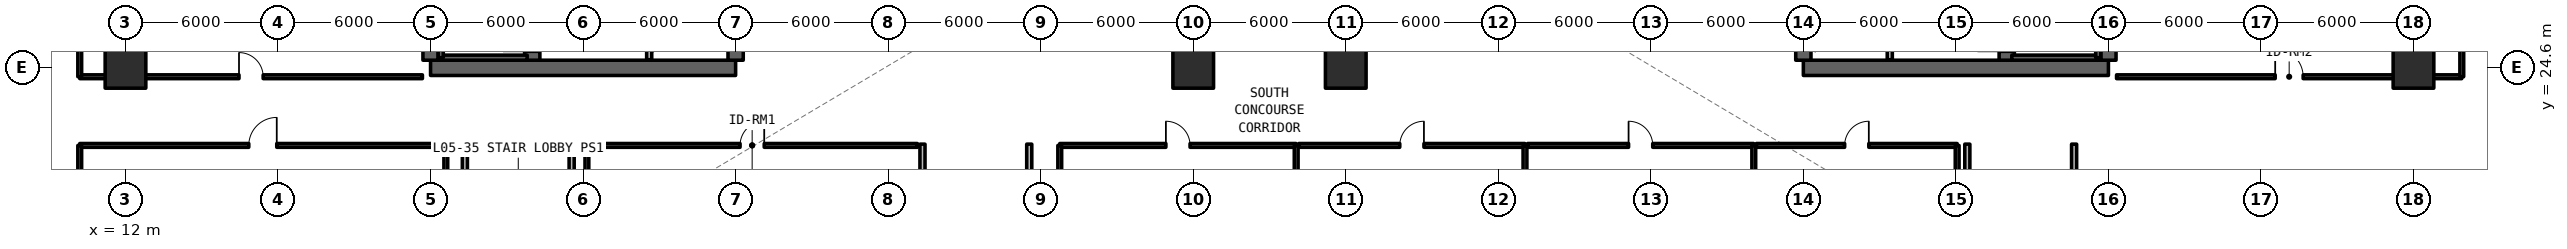
"""IFC4 building model, lengths in metres.
Left out: names, types, materials, properties, quantities, classifications, styles, units other than length and angle.
Written with IfcOpenShell. Run it as: python <this file> out.ifc"""

import sys

from ifc_helpers import new_model, si_unit, direction, frame, frame_2d, origin, origin_2d, place, context, subcontext, project, spatial, rectangle, extrude, element, fill, save


model = new_model("IFC4")
c1 = context("Model", 3, precision=1e-05, world=origin(), true_north=direction((0.0, 1.0)))
c2 = subcontext(c1, "Body", "Model", "MODEL_VIEW")
j1 = project(units=[si_unit("LENGTHUNIT", "METRE"), si_unit("PLANEANGLEUNIT", "RADIAN")], contexts=[c1])
p1 = place(None, origin())
s1 = spatial("IfcSite", under=j1, at=p1, CompositionType="ELEMENT")
p2 = place(p1, origin())
s2 = spatial("IfcBuilding", under=s1, at=p2, CompositionType="ELEMENT")
p3 = place(p2, frame((0.0, 0.0, 19.47)))
s3 = spatial("IfcBuildingStorey", under=s2, at=p3, CompositionType="ELEMENT", Elevation=19.47)
p4 = place(p3, frame((24.0, 24.6, 0.0), z_axis=(0.0, 0.0, 1.0), x_axis=(1.0, 0.0, 0.0)))
e1 = element("IfcWall", 1, at=p4, inside=s3, PredefinedType="SHEAR", context=c2, shape_type="SweptSolid", body=[
    extrude(rectangle(XDim=12.0, YDim=0.6, at=frame_2d((6.0, 0.0))), origin(), (0.0, 0.0, 1.0), 4.62),
])
p5 = place(p3, frame((24.0, 24.9, 0.0), z_axis=(0.0, 0.0, 1.0), x_axis=(0.0, 1.0, 0.0)))
e2 = element("IfcWall", 2, at=p5, inside=s3, PredefinedType="SHEAR", context=c2, shape_type="SweptSolid", body=[
    extrude(rectangle(XDim=17.4, YDim=0.6, at=frame_2d((8.7, 0.0))), origin(), (0.0, 0.0, 1.0), 4.62),
])
p6 = place(p3, frame((36.0, 24.9, 0.0), z_axis=(0.0, 0.0, 1.0), x_axis=(0.0, 1.0, 0.0)))
e3 = element("IfcWall", 3, at=p6, inside=s3, PredefinedType="SHEAR", context=c2, shape_type="SweptSolid", body=[
    extrude(rectangle(XDim=8.9, YDim=0.6, at=frame_2d((4.45, 0.0))), origin(), (0.0, 0.0, 1.0), 4.62),
])
p7 = place(p3, frame((28.0, 24.9, 0.0), z_axis=(0.0, 0.0, 1.0), x_axis=(0.0, 1.0, 0.0)))
e4 = element("IfcWall", 4, at=p7, inside=s3, PredefinedType="SHEAR", context=c2, shape_type="SweptSolid", body=[
    extrude(rectangle(XDim=17.4, YDim=0.6, at=frame_2d((8.7, 0.0))), origin(), (0.0, 0.0, 1.0), 4.62),
])
p8 = place(p7, frame((0.35, 0.0, 0.0)))
e5 = element("IfcOpeningElement", 5, at=p8, cuts=e4, PredefinedType="OPENING", context=c2, shape_type="SweptSolid", body=[
    extrude(rectangle(XDim=1.15, YDim=2.15, at=frame_2d((0.575, 1.075))), frame((0.0, 0.31, 0.0), z_axis=(0.0, -1.0, 0.0), x_axis=(1.0, 0.0, 0.0)), (0.0, 0.0, 1.0), 0.62),
])
p9 = place(p7, frame((9.55, 0.0, 0.0)))
e6 = element("IfcOpeningElement", 6, at=p9, cuts=e4, PredefinedType="OPENING", context=c2, shape_type="SweptSolid", body=[
    extrude(rectangle(XDim=1.15, YDim=2.15, at=frame_2d((0.575, 1.075))), frame((0.0, 0.31, 0.0), z_axis=(0.0, -1.0, 0.0), x_axis=(1.0, 0.0, 0.0)), (0.0, 0.0, 1.0), 0.62),
])
p10 = place(p3, frame((78.0, 24.6, 0.0), z_axis=(0.0, 0.0, 1.0), x_axis=(1.0, 0.0, 0.0)))
e7 = element("IfcWall", 7, at=p10, inside=s3, PredefinedType="SHEAR", context=c2, shape_type="SweptSolid", body=[
    extrude(rectangle(XDim=12.0, YDim=0.6, at=frame_2d((6.0, 0.0))), origin(), (0.0, 0.0, 1.0), 4.62),
])
p11 = place(p3, frame((90.0, 24.9, 0.0), z_axis=(0.0, 0.0, 1.0), x_axis=(0.0, 1.0, 0.0)))
e8 = element("IfcWall", 8, at=p11, inside=s3, PredefinedType="SHEAR", context=c2, shape_type="SweptSolid", body=[
    extrude(rectangle(XDim=17.4, YDim=0.6, at=frame_2d((8.7, 0.0))), origin(), (0.0, 0.0, 1.0), 4.62),
])
p12 = place(p3, frame((78.0, 24.9, 0.0), z_axis=(0.0, 0.0, 1.0), x_axis=(0.0, 1.0, 0.0)))
e9 = element("IfcWall", 9, at=p12, inside=s3, PredefinedType="SHEAR", context=c2, shape_type="SweptSolid", body=[
    extrude(rectangle(XDim=8.9, YDim=0.6, at=frame_2d((4.45, 0.0))), origin(), (0.0, 0.0, 1.0), 4.62),
])
p13 = place(p3, frame((86.0, 24.9, 0.0), z_axis=(0.0, 0.0, 1.0), x_axis=(0.0, 1.0, 0.0)))
e10 = element("IfcWall", 10, at=p13, inside=s3, PredefinedType="SHEAR", context=c2, shape_type="SweptSolid", body=[
    extrude(rectangle(XDim=17.4, YDim=0.6, at=frame_2d((8.7, 0.0))), origin(), (0.0, 0.0, 1.0), 4.62),
])
p14 = place(p13, frame((0.35, 0.0, 0.0)))
e11 = element("IfcOpeningElement", 11, at=p14, cuts=e10, PredefinedType="OPENING", context=c2, shape_type="SweptSolid", body=[
    extrude(rectangle(XDim=1.15, YDim=2.15, at=frame_2d((0.575, 1.075))), frame((0.0, 0.31, 0.0), z_axis=(0.0, -1.0, 0.0), x_axis=(1.0, 0.0, 0.0)), (0.0, 0.0, 1.0), 0.62),
])
p15 = place(p13, frame((9.55, 0.0, 0.0)))
e12 = element("IfcOpeningElement", 12, at=p15, cuts=e10, PredefinedType="OPENING", context=c2, shape_type="SweptSolid", body=[
    extrude(rectangle(XDim=1.15, YDim=2.15, at=frame_2d((0.575, 1.075))), frame((0.0, 0.31, 0.0), z_axis=(0.0, -1.0, 0.0), x_axis=(1.0, 0.0, 0.0)), (0.0, 0.0, 1.0), 0.62),
])
for number, where, z_axis, x_axis in (
    (13, (12.0, 24.6, 0.0), (0.0, 0.0, 1.0), (1.0, 0.0, 0.0)),
    (14, (54.0, 24.6, 0.0), (0.0, 0.0, 1.0), (1.0, 0.0, 0.0)),
    (15, (60.0, 24.6, 0.0), (0.0, 0.0, 1.0), (1.0, 0.0, 0.0)),
    (16, (102.0, 24.6, 0.0), (0.0, 0.0, 1.0), (1.0, 0.0, 0.0)),
):
    element("IfcColumn", number, at=place(p3, frame(where, z_axis=z_axis, x_axis=x_axis)), inside=s3, PredefinedType="COLUMN", context=c2, shape_type="SweptSolid", body=[
        extrude(rectangle(XDim=1.6, YDim=1.6, at=origin_2d()), origin(), (0.0, 0.0, 1.0), 4.62),
    ])
p16 = place(p3, frame((32.6, 24.92, 0.0), z_axis=(0.0, 0.0, 1.0), x_axis=(0.0, 1.0, 0.0)))
e17 = element("IfcWall", 17, at=p16, inside=s3, PredefinedType="SOLIDWALL", context=c2, shape_type="SweptSolid", body=[
    extrude(rectangle(XDim=3.58, YDim=0.2, at=frame_2d((1.79, 0.0))), origin(), (0.0, 0.0, 1.0), 3.49),
])
p17 = place(p16, frame((1.3, 0.0, 0.0)))
e18 = element("IfcOpeningElement", 18, at=p17, cuts=e17, PredefinedType="OPENING", context=c2, shape_type="SweptSolid", body=[
    extrude(rectangle(XDim=1.1, YDim=2.2, at=frame_2d((0.55, 1.1))), frame((0.0, 0.11, 0.0), z_axis=(0.0, -1.0, 0.0), x_axis=(1.0, 0.0, 0.0)), (0.0, 0.0, 1.0), 0.22),
])
p18 = place(p3, frame((81.4, 24.92, 0.0), z_axis=(0.0, 0.0, 1.0), x_axis=(0.0, 1.0, 0.0)))
e19 = element("IfcWall", 19, at=p18, inside=s3, PredefinedType="SOLIDWALL", context=c2, shape_type="SweptSolid", body=[
    extrude(rectangle(XDim=3.58, YDim=0.2, at=frame_2d((1.79, 0.0))), origin(), (0.0, 0.0, 1.0), 3.49),
])
p19 = place(p18, frame((1.3, 0.0, 0.0)))
e20 = element("IfcOpeningElement", 20, at=p19, cuts=e19, PredefinedType="OPENING", context=c2, shape_type="SweptSolid", body=[
    extrude(rectangle(XDim=1.1, YDim=2.2, at=frame_2d((0.55, 1.1))), frame((0.0, 0.11, 0.0), z_axis=(0.0, -1.0, 0.0), x_axis=(1.0, 0.0, 0.0)), (0.0, 0.0, 1.0), 0.22),
])
for number, where, z_axis, x_axis in (
    (21, (25.35, 17.0, 0.0), (0.0, 0.0, 1.0), (0.0, 1.0, 0.0)),
    (22, (29.55, 17.0, 0.0), (0.0, 0.0, 1.0), (0.0, 1.0, 0.0)),
    (23, (43.35, 17.0, 0.0), (0.0, 0.0, 1.0), (0.0, 1.0, 0.0)),
    (24, (47.55, 17.0, 0.0), (0.0, 0.0, 1.0), (0.0, 1.0, 0.0)),
    (25, (84.45, 17.0, 0.0), (0.0, 0.0, 1.0), (0.0, 1.0, 0.0)),
    (26, (88.65, 17.0, 0.0), (0.0, 0.0, 1.0), (0.0, 1.0, 0.0)),
):
    element("IfcWall", number, at=place(p3, frame(where, z_axis=z_axis, x_axis=x_axis)), inside=s3, PredefinedType="SOLIDWALL", context=c2, shape_type="SweptSolid", body=[
        extrude(rectangle(XDim=4.6, YDim=0.2, at=frame_2d((2.3, 0.0))), origin(), (0.0, 0.0, 1.0), 3.49),
    ])
p20 = place(p3, frame((30.15, 21.55, 0.0), z_axis=(0.0, 0.0, 1.0), x_axis=(1.0, 0.0, 0.0)))
e27 = element("IfcWall", 27, at=p20, inside=s3, PredefinedType="SOLIDWALL", context=c2, shape_type="SweptSolid", body=[
    extrude(rectangle(XDim=13.0, YDim=0.15, at=frame_2d((6.5, 0.0))), origin(), (0.0, 0.0, 1.0), 3.49),
])
p21 = place(p20, frame((6.025, 0.0, 0.0)))
e28 = element("IfcOpeningElement", 28, at=p21, cuts=e27, PredefinedType="OPENING", context=c2, shape_type="SweptSolid", body=[
    extrude(rectangle(XDim=0.95, YDim=2.15, at=frame_2d((0.475, 1.075))), frame((0.0, 0.085, 0.0), z_axis=(0.0, -1.0, 0.0), x_axis=(1.0, 0.0, 0.0)), (0.0, 0.0, 1.0), 0.17),
])
p22 = place(p3, frame((30.15, 4.28, 0.0), z_axis=(0.0, 0.0, 1.0), x_axis=(0.0, 1.0, 0.0)))
e29 = element("IfcWall", 29, at=p22, inside=s3, PredefinedType="SOLIDWALL", context=c2, shape_type="SweptSolid", body=[
    extrude(rectangle(XDim=17.27, YDim=0.15, at=frame_2d((8.635, 0.0))), origin(), (0.0, 0.0, 1.0), 3.49),
])
p23 = place(p3, frame((48.75, 21.55, 0.0), z_axis=(0.0, 0.0, 1.0), x_axis=(1.0, 0.0, 0.0)))
e30 = element("IfcWall", 30, at=p23, inside=s3, PredefinedType="SOLIDWALL", context=c2, shape_type="SweptSolid", body=[
    extrude(rectangle(XDim=9.3, YDim=0.15, at=frame_2d((4.65, 0.0))), origin(), (0.0, 0.0, 1.0), 3.49),
])
p24 = place(p23, frame((4.175, 0.0, 0.0)))
e31 = element("IfcOpeningElement", 31, at=p24, cuts=e30, PredefinedType="OPENING", context=c2, shape_type="SweptSolid", body=[
    extrude(rectangle(XDim=0.95, YDim=2.15, at=frame_2d((0.475, 1.075))), frame((0.0, 0.085, 0.0), z_axis=(0.0, -1.0, 0.0), x_axis=(1.0, 0.0, 0.0)), (0.0, 0.0, 1.0), 0.17),
])
for number, where, z_axis, x_axis in (
    (32, (48.75, 4.28, 0.0), (0.0, 0.0, 1.0), (0.0, 1.0, 0.0)),
    (33, (58.05, 4.28, 0.0), (0.0, 0.0, 1.0), (0.0, 1.0, 0.0)),
):
    element("IfcWall", number, at=place(p3, frame(where, z_axis=z_axis, x_axis=x_axis)), inside=s3, PredefinedType="SOLIDWALL", context=c2, shape_type="SweptSolid", body=[
        extrude(rectangle(XDim=17.27, YDim=0.15, at=frame_2d((8.635, 0.0))), origin(), (0.0, 0.0, 1.0), 3.49),
    ])
p25 = place(p3, frame((58.15, 21.55, 0.0), z_axis=(0.0, 0.0, 1.0), x_axis=(1.0, 0.0, 0.0)))
e34 = element("IfcWall", 34, at=p25, inside=s3, PredefinedType="SOLIDWALL", context=c2, shape_type="SweptSolid", body=[
    extrude(rectangle(XDim=8.9, YDim=0.15, at=frame_2d((4.45, 0.0))), origin(), (0.0, 0.0, 1.0), 3.49),
])
p26 = place(p25, frame((3.975, 0.0, 0.0)))
e35 = element("IfcOpeningElement", 35, at=p26, cuts=e34, PredefinedType="OPENING", context=c2, shape_type="SweptSolid", body=[
    extrude(rectangle(XDim=0.95, YDim=2.15, at=frame_2d((0.475, 1.075))), frame((0.0, 0.085, 0.0), z_axis=(0.0, -1.0, 0.0), x_axis=(1.0, 0.0, 0.0)), (0.0, 0.0, 1.0), 0.17),
])
p27 = place(p3, frame((67.05, 4.28, 0.0), z_axis=(0.0, 0.0, 1.0), x_axis=(0.0, 1.0, 0.0)))
e36 = element("IfcWall", 36, at=p27, inside=s3, PredefinedType="SOLIDWALL", context=c2, shape_type="SweptSolid", body=[
    extrude(rectangle(XDim=17.27, YDim=0.15, at=frame_2d((8.635, 0.0))), origin(), (0.0, 0.0, 1.0), 3.49),
])
p28 = place(p3, frame((67.15, 21.55, 0.0), z_axis=(0.0, 0.0, 1.0), x_axis=(1.0, 0.0, 0.0)))
e37 = element("IfcWall", 37, at=p28, inside=s3, PredefinedType="SOLIDWALL", context=c2, shape_type="SweptSolid", body=[
    extrude(rectangle(XDim=8.9, YDim=0.15, at=frame_2d((4.45, 0.0))), origin(), (0.0, 0.0, 1.0), 3.49),
])
p29 = place(p28, frame((3.975, 0.0, 0.0)))
e38 = element("IfcOpeningElement", 38, at=p29, cuts=e37, PredefinedType="OPENING", context=c2, shape_type="SweptSolid", body=[
    extrude(rectangle(XDim=0.95, YDim=2.15, at=frame_2d((0.475, 1.075))), frame((0.0, 0.085, 0.0), z_axis=(0.0, -1.0, 0.0), x_axis=(1.0, 0.0, 0.0)), (0.0, 0.0, 1.0), 0.17),
])
p30 = place(p3, frame((76.05, 4.28, 0.0), z_axis=(0.0, 0.0, 1.0), x_axis=(0.0, 1.0, 0.0)))
e39 = element("IfcWall", 39, at=p30, inside=s3, PredefinedType="SOLIDWALL", context=c2, shape_type="SweptSolid", body=[
    extrude(rectangle(XDim=17.27, YDim=0.15, at=frame_2d((8.635, 0.0))), origin(), (0.0, 0.0, 1.0), 3.49),
])
p31 = place(p3, frame((76.15, 21.55, 0.0), z_axis=(0.0, 0.0, 1.0), x_axis=(1.0, 0.0, 0.0)))
e40 = element("IfcWall", 40, at=p31, inside=s3, PredefinedType="SOLIDWALL", context=c2, shape_type="SweptSolid", body=[
    extrude(rectangle(XDim=7.9, YDim=0.15, at=frame_2d((3.95, 0.0))), origin(), (0.0, 0.0, 1.0), 3.49),
])
p32 = place(p31, frame((3.475, 0.0, 0.0)))
e41 = element("IfcOpeningElement", 41, at=p32, cuts=e40, PredefinedType="OPENING", context=c2, shape_type="SweptSolid", body=[
    extrude(rectangle(XDim=0.95, YDim=2.15, at=frame_2d((0.475, 1.075))), frame((0.0, 0.085, 0.0), z_axis=(0.0, -1.0, 0.0), x_axis=(1.0, 0.0, 0.0)), (0.0, 0.0, 1.0), 0.17),
])
p33 = place(p3, frame((84.05, 4.28, 0.0), z_axis=(0.0, 0.0, 1.0), x_axis=(0.0, 1.0, 0.0)))
e42 = element("IfcWall", 42, at=p33, inside=s3, PredefinedType="SOLIDWALL", context=c2, shape_type="SweptSolid", body=[
    extrude(rectangle(XDim=17.27, YDim=0.15, at=frame_2d((8.635, 0.0))), origin(), (0.0, 0.0, 1.0), 3.49),
])
p34 = place(p3, frame((10.2, 24.25, 0.0), z_axis=(0.0, 0.0, 1.0), x_axis=(1.0, 0.0, 0.0)))
e43 = element("IfcWall", 43, at=p34, inside=s3, PredefinedType="SOLIDWALL", context=c2, shape_type="SweptSolid", body=[
    extrude(rectangle(XDim=13.48, YDim=0.15, at=frame_2d((6.74, 0.0))), origin(), (0.0, 0.0, 1.0), 3.49),
])
p35 = place(p34, frame((6.265, 0.0, 0.0)))
e44 = element("IfcOpeningElement", 44, at=p35, cuts=e43, PredefinedType="OPENING", context=c2, shape_type="SweptSolid", body=[
    extrude(rectangle(XDim=0.95, YDim=2.15, at=frame_2d((0.475, 1.075))), frame((0.0, 0.085, 0.0), z_axis=(0.0, -1.0, 0.0), x_axis=(1.0, 0.0, 0.0)), (0.0, 0.0, 1.0), 0.17),
])
p36 = place(p3, frame((10.2, 24.25, 0.0), z_axis=(0.0, 0.0, 1.0), x_axis=(0.0, 1.0, 0.0)))
e45 = element("IfcWall", 45, at=p36, inside=s3, PredefinedType="SOLIDWALL", context=c2, shape_type="SweptSolid", body=[
    extrude(rectangle(XDim=9.15, YDim=0.15, at=frame_2d((4.575, 0.0))), origin(), (0.0, 0.0, 1.0), 3.49),
])
p37 = place(p3, frame((90.32, 24.25, 0.0), z_axis=(0.0, 0.0, 1.0), x_axis=(1.0, 0.0, 0.0)))
e46 = element("IfcWall", 46, at=p37, inside=s3, PredefinedType="SOLIDWALL", context=c2, shape_type="SweptSolid", body=[
    extrude(rectangle(XDim=13.58, YDim=0.15, at=frame_2d((6.79, 0.0))), origin(), (0.0, 0.0, 1.0), 3.49),
])
p38 = place(p37, frame((6.24, 0.0, 0.0)))
e47 = element("IfcOpeningElement", 47, at=p38, cuts=e46, PredefinedType="OPENING", context=c2, shape_type="SweptSolid", body=[
    extrude(rectangle(XDim=1.1, YDim=2.15, at=frame_2d((0.55, 1.075))), frame((0.0, 0.085, 0.0), z_axis=(0.0, -1.0, 0.0), x_axis=(1.0, 0.0, 0.0)), (0.0, 0.0, 1.0), 0.17),
])
p39 = place(p3, frame((103.9, 24.25, 0.0), z_axis=(0.0, 0.0, 1.0), x_axis=(0.0, 1.0, 0.0)))
e48 = element("IfcWall", 48, at=p39, inside=s3, PredefinedType="SOLIDWALL", context=c2, shape_type="SweptSolid", body=[
    extrude(rectangle(XDim=18.7, YDim=0.15, at=frame_2d((9.35, 0.0))), origin(), (0.0, 0.0, 1.0), 3.49),
])
p40 = place(p3, frame((10.2, 21.55, 0.0), z_axis=(0.0, 0.0, 1.0), x_axis=(1.0, 0.0, 0.0)))
e49 = element("IfcWall", 49, at=p40, inside=s3, PredefinedType="SOLIDWALL", context=c2, shape_type="SweptSolid", body=[
    extrude(rectangle(XDim=14.4, YDim=0.15, at=frame_2d((7.2, 0.0))), origin(), (0.0, 0.0, 1.0), 3.49),
])
p41 = place(p40, frame((6.65, 0.0, 0.0)))
e50 = element("IfcOpeningElement", 50, at=p41, cuts=e49, PredefinedType="OPENING", context=c2, shape_type="SweptSolid", body=[
    extrude(rectangle(XDim=1.1, YDim=2.15, at=frame_2d((0.55, 1.075))), frame((0.0, 0.085, 0.0), z_axis=(0.0, -1.0, 0.0), x_axis=(1.0, 0.0, 0.0)), (0.0, 0.0, 1.0), 0.17),
])
for number, where, z_axis, x_axis in (
    (51, (10.2, 4.28, 0.0), (0.0, 0.0, 1.0), (0.0, 1.0, 0.0)),
    (52, (24.6, 4.28, 0.0), (0.0, 0.0, 1.0), (0.0, 1.0, 0.0)),
):
    element("IfcWall", number, at=place(p3, frame(where, z_axis=z_axis, x_axis=x_axis)), inside=s3, PredefinedType="SOLIDWALL", context=c2, shape_type="SweptSolid", body=[
        extrude(rectangle(XDim=17.27, YDim=0.15, at=frame_2d((8.635, 0.0))), origin(), (0.0, 0.0, 1.0), 3.49),
    ])
p42 = place(p3, frame((24.4, 25.0, 0.0), z_axis=(0.0, 0.0, 1.0), x_axis=(1.0, 0.0, 0.0)))
e53 = element("IfcWall", 53, at=p42, inside=s3, PredefinedType="SOLIDWALL", context=c2, shape_type="SweptSolid", body=[
    extrude(rectangle(XDim=3.4, YDim=0.2, at=frame_2d((1.7, 0.0))), origin(), (0.0, 0.0, 1.0), 4.62),
])
p43 = place(p3, frame((24.4, 33.0, 0.0), z_axis=(0.0, 0.0, 1.0), x_axis=(0.0, -1.0, 0.0)))
e54 = element("IfcWall", 54, at=p43, inside=s3, PredefinedType="SOLIDWALL", context=c2, shape_type="SweptSolid", body=[
    extrude(rectangle(XDim=8.0, YDim=0.2, at=frame_2d((4.0, 0.0))), origin(), (0.0, 0.0, 1.0), 4.62),
])
p44 = place(p3, frame((86.2, 25.0, 0.0), z_axis=(0.0, 0.0, 1.0), x_axis=(1.0, 0.0, 0.0)))
e55 = element("IfcWall", 55, at=p44, inside=s3, PredefinedType="SOLIDWALL", context=c2, shape_type="SweptSolid", body=[
    extrude(rectangle(XDim=3.4, YDim=0.2, at=frame_2d((1.7, 0.0))), origin(), (0.0, 0.0, 1.0), 4.62),
])
p45 = place(p3, frame((89.6, 25.0, 0.0), z_axis=(0.0, 0.0, 1.0), x_axis=(0.0, 1.0, 0.0)))
e56 = element("IfcWall", 56, at=p45, inside=s3, PredefinedType="SOLIDWALL", context=c2, shape_type="SweptSolid", body=[
    extrude(rectangle(XDim=8.0, YDim=0.2, at=frame_2d((4.0, 0.0))), origin(), (0.0, 0.0, 1.0), 4.62),
])
p46 = place(p21, origin())
e57 = element("IfcDoor", 57, at=p46, inside=s3, OperationType="SINGLE_SWING_RIGHT", PredefinedType="DOOR", context=c2, shape_type="SweptSolid", body=[
    extrude(rectangle(XDim=0.95, YDim=2.15, at=frame_2d((0.475, 1.075))), frame((0.0, 0.025, 0.0), z_axis=(0.0, -1.0, 0.0), x_axis=(1.0, 0.0, 0.0)), (0.0, 0.0, 1.0), 0.05),
])
fill(e28, e57)
p47 = place(p24, origin())
e58 = element("IfcDoor", 58, at=p47, inside=s3, OperationType="SINGLE_SWING_LEFT", PredefinedType="DOOR", context=c2, shape_type="SweptSolid", body=[
    extrude(rectangle(XDim=0.95, YDim=2.15, at=frame_2d((0.475, 1.075))), frame((0.0, 0.025, 0.0), z_axis=(0.0, -1.0, 0.0), x_axis=(1.0, 0.0, 0.0)), (0.0, 0.0, 1.0), 0.05),
])
fill(e31, e58)
p48 = place(p26, origin())
e59 = element("IfcDoor", 59, at=p48, inside=s3, OperationType="SINGLE_SWING_RIGHT", PredefinedType="DOOR", context=c2, shape_type="SweptSolid", body=[
    extrude(rectangle(XDim=0.95, YDim=2.15, at=frame_2d((0.475, 1.075))), frame((0.0, 0.025, 0.0), z_axis=(0.0, -1.0, 0.0), x_axis=(1.0, 0.0, 0.0)), (0.0, 0.0, 1.0), 0.05),
])
fill(e35, e59)
p49 = place(p29, origin())
e60 = element("IfcDoor", 60, at=p49, inside=s3, OperationType="SINGLE_SWING_LEFT", PredefinedType="DOOR", context=c2, shape_type="SweptSolid", body=[
    extrude(rectangle(XDim=0.95, YDim=2.15, at=frame_2d((0.475, 1.075))), frame((0.0, 0.025, 0.0), z_axis=(0.0, -1.0, 0.0), x_axis=(1.0, 0.0, 0.0)), (0.0, 0.0, 1.0), 0.05),
])
fill(e38, e60)
p50 = place(p32, origin())
e61 = element("IfcDoor", 61, at=p50, inside=s3, OperationType="SINGLE_SWING_RIGHT", PredefinedType="DOOR", context=c2, shape_type="SweptSolid", body=[
    extrude(rectangle(XDim=0.95, YDim=2.15, at=frame_2d((0.475, 1.075))), frame((0.0, 0.025, 0.0), z_axis=(0.0, -1.0, 0.0), x_axis=(1.0, 0.0, 0.0)), (0.0, 0.0, 1.0), 0.05),
])
fill(e41, e61)
p51 = place(p35, origin())
e62 = element("IfcDoor", 62, at=p51, inside=s3, OperationType="SINGLE_SWING_LEFT", PredefinedType="DOOR", context=c2, shape_type="SweptSolid", body=[
    extrude(rectangle(XDim=0.95, YDim=2.15, at=frame_2d((0.475, 1.075))), frame((0.0, 0.025, 0.0), z_axis=(0.0, -1.0, 0.0), x_axis=(1.0, 0.0, 0.0)), (0.0, 0.0, 1.0), 0.05),
])
fill(e44, e62)
p52 = place(p38, origin())
e63 = element("IfcDoor", 63, at=p52, inside=s3, OperationType="SINGLE_SWING_LEFT", PredefinedType="DOOR", context=c2, shape_type="SweptSolid", body=[
    extrude(rectangle(XDim=1.1, YDim=2.15, at=frame_2d((0.55, 1.075))), frame((0.0, 0.025, 0.0), z_axis=(0.0, -1.0, 0.0), x_axis=(1.0, 0.0, 0.0)), (0.0, 0.0, 1.0), 0.05),
])
fill(e47, e63)
p53 = place(p41, origin())
e64 = element("IfcDoor", 64, at=p53, inside=s3, OperationType="SINGLE_SWING_RIGHT", PredefinedType="DOOR", context=c2, shape_type="SweptSolid", body=[
    extrude(rectangle(XDim=1.1, YDim=2.15, at=frame_2d((0.55, 1.075))), frame((0.0, 0.025, 0.0), z_axis=(0.0, -1.0, 0.0), x_axis=(1.0, 0.0, 0.0)), (0.0, 0.0, 1.0), 0.05),
])
fill(e50, e64)
save(model, sys.argv[1])
